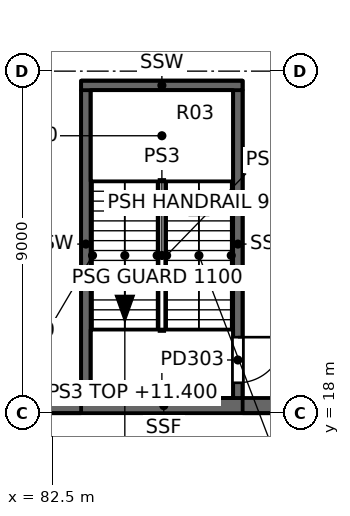
"""IFC4 building model, lengths in metres.
Left out: names, types, materials, properties, quantities, classifications, styles, units other than length and angle.
Written with IfcOpenShell. Run it as: python <this file> out.ifc"""

import sys

from ifc_helpers import new_model, si_unit, direction, frame, frame_2d, origin, place, context, subcontext, project, spatial, rectangle, extrude, element, fill, save


model = new_model("IFC4")
c1 = context("Model", 3, precision=1e-05, world=origin(), true_north=direction((0.0, 1.0)))
c2 = subcontext(c1, "Body", "Model", "MODEL_VIEW")
j1 = project(units=[si_unit("LENGTHUNIT", "METRE"), si_unit("PLANEANGLEUNIT", "RADIAN")], contexts=[c1])
p1 = place(None, origin())
s1 = spatial("IfcSite", under=j1, at=p1, CompositionType="ELEMENT")
p2 = place(p1, origin())
s2 = spatial("IfcBuilding", under=s1, at=p2, CompositionType="ELEMENT")
p3 = place(p2, frame((0.0, 0.0, 11.4)))
s3 = spatial("IfcBuildingStorey", under=s2, at=p3, CompositionType="ELEMENT", Elevation=11.4)
p4 = place(p3, frame((83.375, 18.4, 0.0), z_axis=(0.0, 0.0, 1.0), x_axis=(0.0, 1.0, 0.0)))
e1 = element("IfcWall", 1, at=p4, inside=s3, PredefinedType="SOLIDWALL", context=c2, shape_type="SweptSolid", body=[
    extrude(rectangle(XDim=8.1, YDim=0.25, at=frame_2d((4.05, 0.0))), origin(), (0.0, 0.0, 1.0), 5.4),
])
p5 = place(p3, frame((87.375, 26.5, 0.0), z_axis=(0.0, 0.0, 1.0), x_axis=(0.0, -1.0, 0.0)))
e2 = element("IfcWall", 2, at=p5, inside=s3, PredefinedType="SOLIDWALL", context=c2, shape_type="SweptSolid", body=[
    extrude(rectangle(XDim=8.1, YDim=0.25, at=frame_2d((4.05, 0.0))), origin(), (0.0, 0.0, 1.0), 5.4),
])
p6 = place(p5, frame((6.5, 0.0, 0.0)))
e3 = element("IfcOpeningElement", 3, at=p6, cuts=e2, PredefinedType="OPENING", context=c2, shape_type="SweptSolid", body=[
    extrude(rectangle(XDim=1.2, YDim=2.1, at=frame_2d((0.6, 1.05))), frame((0.0, 0.125, 0.0), z_axis=(0.0, -1.0, 0.0), x_axis=(1.0, 0.0, 0.0)), (0.0, 0.0, 1.0), 0.25),
])
p7 = place(p3, frame((83.25, 26.625, 0.0), z_axis=(0.0, 0.0, 1.0), x_axis=(1.0, 0.0, 0.0)))
e4 = element("IfcWall", 4, at=p7, inside=s3, PredefinedType="SOLIDWALL", context=c2, shape_type="SweptSolid", body=[
    extrude(rectangle(XDim=4.25, YDim=0.25, at=frame_2d((2.125, 0.0))), origin(), (0.0, 0.0, 1.0), 5.4),
])
p8 = place(p3, frame((89.1, 18.2, 0.0), z_axis=(0.0, 0.0, 1.0), x_axis=(-1.0, 0.0, 0.0)))
e5 = element("IfcWall", 5, at=p8, inside=s3, PredefinedType="SOLIDWALL", context=c2, shape_type="SweptSolid", body=[
    extrude(rectangle(XDim=7.35, YDim=0.4, at=frame_2d((3.675, 0.0))), origin(), (0.0, 0.0, 1.0), 5.05),
])
p9 = place(p6, origin())
e6 = element("IfcDoor", 6, at=p9, inside=s3, OperationType="SINGLE_SWING_LEFT", PredefinedType="DOOR", context=c2, shape_type="SweptSolid", body=[
    extrude(rectangle(XDim=1.2, YDim=2.1, at=frame_2d((0.6, 1.05))), frame((0.0, 0.025, 0.0), z_axis=(0.0, -1.0, 0.0), x_axis=(1.0, 0.0, 0.0)), (0.0, 0.0, 1.0), 0.05),
])
fill(e3, e6)
save(model, sys.argv[1])
